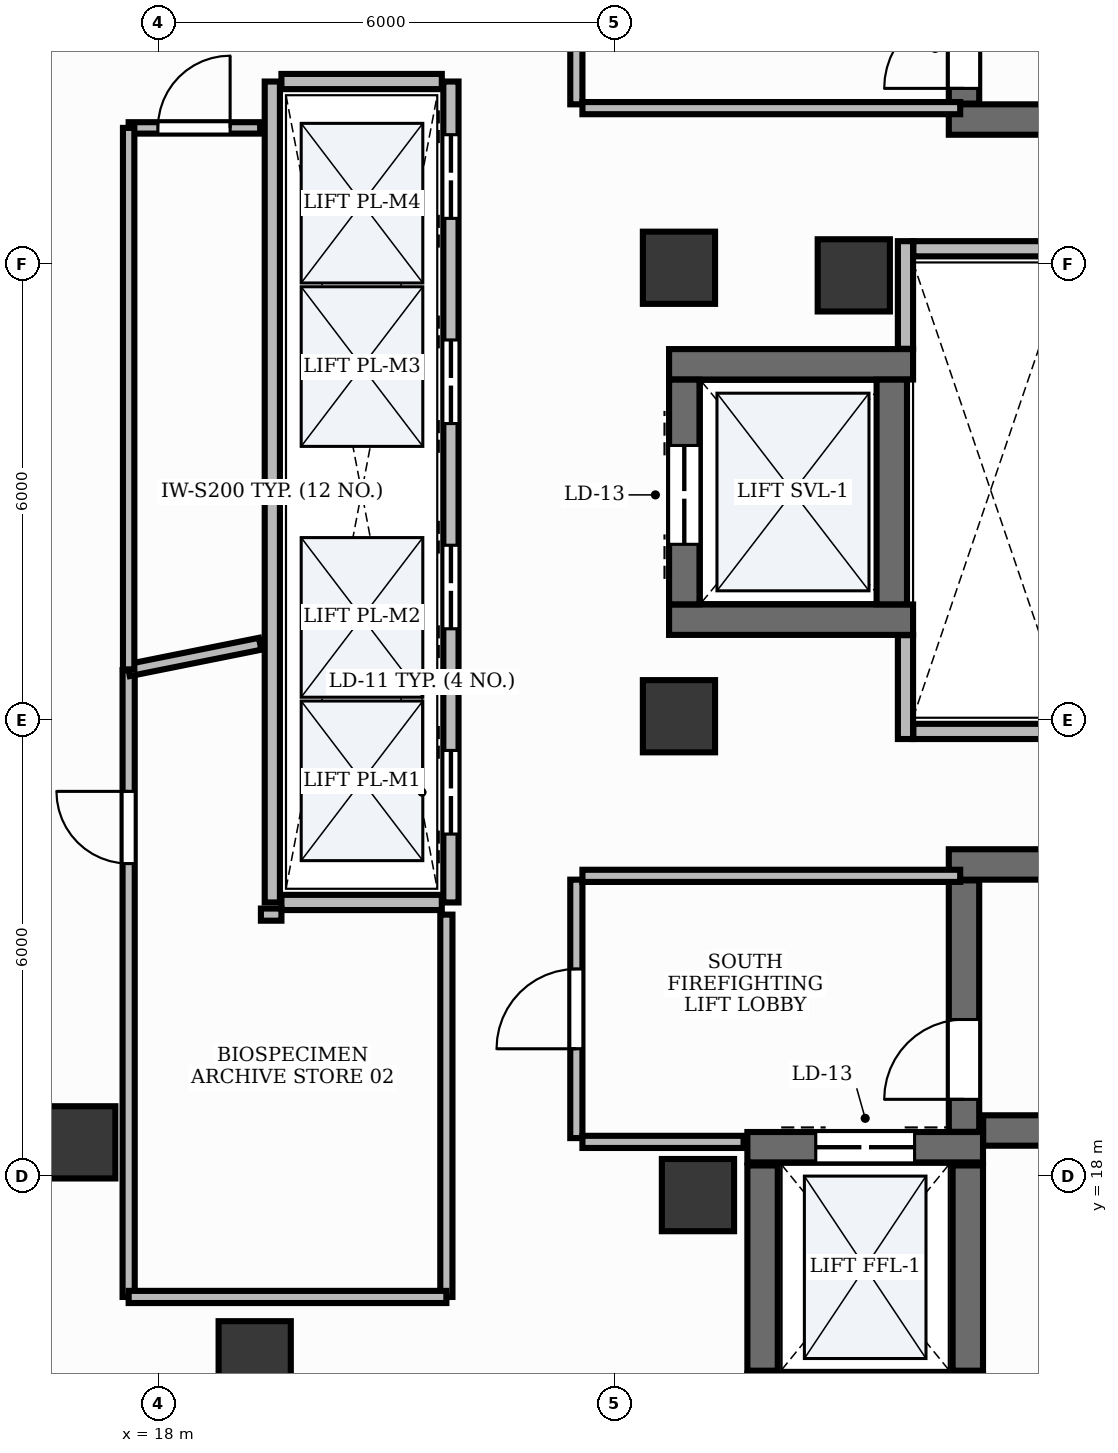
"""IFC4 building model, lengths in metres.
Left out: names, types, materials, properties, quantities, classifications, styles, units other than length and angle.
Written with IfcOpenShell. Run it as: python <this file> out.ifc"""

import sys

from ifc_helpers import new_model, si_unit, direction, frame, frame_2d, origin, origin_2d, place, context, subcontext, project, spatial, rectangle, extrude, element, fill, save


model = new_model("IFC4")
c1 = context("Model", 3, precision=1e-05, world=origin(), true_north=direction((0.0, 1.0)))
c2 = subcontext(c1, "Body", "Model", "MODEL_VIEW")
j1 = project(units=[si_unit("LENGTHUNIT", "METRE"), si_unit("PLANEANGLEUNIT", "RADIAN")], contexts=[c1])
p1 = place(None, origin())
s1 = spatial("IfcSite", under=j1, at=p1, CompositionType="ELEMENT")
p2 = place(p1, origin())
s2 = spatial("IfcBuilding", under=s1, at=p2, CompositionType="ELEMENT")
p3 = place(p2, frame((0.0, 0.0, 235.2)))
s3 = spatial("IfcBuildingStorey", under=s2, at=p3, CompositionType="ELEMENT", Elevation=235.2)
p4 = place(p3, frame((28.4, 31.9, 0.0), z_axis=(0.0, 0.0, 1.0), x_axis=(1.0, 0.0, 0.0)))
e1 = element("IfcWall", 1, at=p4, inside=s3, PredefinedType="SHEAR", context=c2, shape_type="SweptSolid", body=[
    extrude(rectangle(XDim=8.65, YDim=0.4, at=frame_2d((4.325, 0.0))), origin(), (0.0, 0.0, 1.0), 3.9),
])
p5 = place(p3, frame((28.6, 32.11, 0.0), z_axis=(0.0, 0.0, 1.0), x_axis=(0.0, 1.0, 0.0)))
e2 = element("IfcWall", 2, at=p5, inside=s3, PredefinedType="SHEAR", context=c2, shape_type="SweptSolid", body=[
    extrude(rectangle(XDim=3.308, YDim=0.4, at=frame_2d((1.654, 0.0))), origin(), (0.0, 0.0, 1.0), 3.9),
])
p6 = place(p5, frame((0.2, 0.0, 0.0)))
e3 = element("IfcOpeningElement", 3, at=p6, cuts=e2, PredefinedType="OPENING", context=c2, shape_type="SweptSolid", body=[
    extrude(rectangle(XDim=1.05, YDim=2.15, at=frame_2d((0.525, 1.075))), frame((0.0, 0.215, 0.0), z_axis=(0.0, -1.0, 0.0), x_axis=(1.0, 0.0, 0.0)), (0.0, 0.0, 1.0), 0.43),
])
p7 = place(p3, frame((28.852, 18.6, 0.0), z_axis=(0.0, 0.0, 1.0), x_axis=(1.0, 0.0, 0.0)))
e4 = element("IfcWall", 4, at=p7, inside=s3, PredefinedType="SHEAR", context=c2, shape_type="SweptSolid", body=[
    extrude(rectangle(XDim=8.198, YDim=0.4, at=frame_2d((4.099, 0.0))), origin(), (0.0, 0.0, 1.0), 3.9),
])
p8 = place(p3, frame((28.4, 22.1, 0.0), z_axis=(0.0, 0.0, 1.0), x_axis=(1.0, 0.0, 0.0)))
e5 = element("IfcWall", 5, at=p8, inside=s3, PredefinedType="SHEAR", context=c2, shape_type="SweptSolid", body=[
    extrude(rectangle(XDim=8.65, YDim=0.4, at=frame_2d((4.325, 0.0))), origin(), (0.0, 0.0, 1.0), 3.9),
])
p9 = place(p3, frame((28.6, 18.582, 0.0), z_axis=(0.0, 0.0, 1.0), x_axis=(0.0, 1.0, 0.0)))
e6 = element("IfcWall", 6, at=p9, inside=s3, PredefinedType="SHEAR", context=c2, shape_type="SweptSolid", body=[
    extrude(rectangle(XDim=3.308, YDim=0.4, at=frame_2d((1.654, 0.0))), origin(), (0.0, 0.0, 1.0), 3.9),
])
p10 = place(p9, frame((0.428, 0.0, 0.0)))
e7 = element("IfcOpeningElement", 7, at=p10, cuts=e6, PredefinedType="OPENING", context=c2, shape_type="SweptSolid", body=[
    extrude(rectangle(XDim=1.05, YDim=2.15, at=frame_2d((0.525, 1.075))), frame((0.0, 0.215, 0.0), z_axis=(0.0, -1.0, 0.0), x_axis=(1.0, 0.0, 0.0)), (0.0, 0.0, 1.0), 0.43),
])
p11 = place(p3, frame((25.75, 18.38, 0.0), z_axis=(0.0, 0.0, 1.0), x_axis=(1.0, 0.0, 0.0)))
e8 = element("IfcWall", 8, at=p11, inside=s3, PredefinedType="SHEAR", context=c2, shape_type="SweptSolid", body=[
    extrude(rectangle(XDim=3.1, YDim=0.4, at=frame_2d((1.55, 0.0))), origin(), (0.0, 0.0, 1.0), 3.9),
])
p12 = place(p11, frame((0.9, 0.0, 0.0)))
e9 = element("IfcOpeningElement", 9, at=p12, cuts=e8, PredefinedType="OPENING", context=c2, shape_type="SweptSolid", body=[
    extrude(rectangle(XDim=1.3, YDim=2.2, at=frame_2d((0.65, 1.1))), frame((0.0, 0.215, 0.0), z_axis=(0.0, -1.0, 0.0), x_axis=(1.0, 0.0, 0.0)), (0.0, 0.0, 1.0), 0.43),
])
for number, where, z_axis, x_axis in (
    (10, (25.95, 15.44, 0.0), (0.0, 0.0, 1.0), (0.0, 1.0, 0.0)),
    (11, (28.65, 15.44, 0.0), (0.0, 0.0, 1.0), (0.0, 1.0, 0.0)),
):
    element("IfcWall", number, at=place(p3, frame(where, z_axis=z_axis, x_axis=x_axis)), inside=s3, PredefinedType="SHEAR", context=c2, shape_type="SweptSolid", body=[
        extrude(rectangle(XDim=2.7, YDim=0.4, at=frame_2d((1.35, 0.0))), origin(), (0.0, 0.0, 1.0), 3.9),
    ])
for number, where, z_axis, x_axis in (
    (12, (24.72, 28.68, 0.0), (0.0, 0.0, 1.0), (1.0, 0.0, 0.0)),
    (13, (24.72, 25.32, 0.0), (0.0, 0.0, 1.0), (1.0, 0.0, 0.0)),
):
    element("IfcWall", number, at=place(p3, frame(where, z_axis=z_axis, x_axis=x_axis)), inside=s3, PredefinedType="SHEAR", context=c2, shape_type="SweptSolid", body=[
        extrude(rectangle(XDim=3.21, YDim=0.4, at=frame_2d((1.605, 0.0))), origin(), (0.0, 0.0, 1.0), 3.9),
    ])
p13 = place(p3, frame((24.92, 25.522, 0.0), z_axis=(0.0, 0.0, 1.0), x_axis=(0.0, 1.0, 0.0)))
e14 = element("IfcWall", 14, at=p13, inside=s3, PredefinedType="SHEAR", context=c2, shape_type="SweptSolid", body=[
    extrude(rectangle(XDim=2.956, YDim=0.4, at=frame_2d((1.478, 0.0))), origin(), (0.0, 0.0, 1.0), 3.9),
])
p14 = place(p13, frame((0.79, 0.0, 0.0)))
e15 = element("IfcOpeningElement", 15, at=p14, cuts=e14, PredefinedType="OPENING", context=c2, shape_type="SweptSolid", body=[
    extrude(rectangle(XDim=1.3, YDim=2.2, at=frame_2d((0.65, 1.1))), frame((0.0, 0.215, 0.0), z_axis=(0.0, -1.0, 0.0), x_axis=(1.0, 0.0, 0.0)), (0.0, 0.0, 1.0), 0.43),
])
p15 = place(p3, frame((27.65, 25.522, 0.0), z_axis=(0.0, 0.0, 1.0), x_axis=(0.0, 1.0, 0.0)))
e16 = element("IfcWall", 16, at=p15, inside=s3, PredefinedType="SHEAR", context=c2, shape_type="SweptSolid", body=[
    extrude(rectangle(XDim=2.956, YDim=0.4, at=frame_2d((1.478, 0.0))), origin(), (0.0, 0.0, 1.0), 3.9),
])
for number, where, z_axis, x_axis in (
    (17, (24.85, 29.95, -0.0), (0.0, 0.0, 1.0), (1.0, 0.0, 0.0)),
    (18, (27.15, 29.85, -0.0), (0.0, 0.0, 1.0), (1.0, 0.0, 0.0)),
    (19, (24.85, 24.05, -0.0), (0.0, 0.0, 1.0), (1.0, 0.0, 0.0)),
    (20, (25.1, 17.75, -0.0), (0.0, 0.0, 1.0), (1.0, 0.0, 0.0)),
):
    element("IfcColumn", number, at=place(p3, frame(where, z_axis=z_axis, x_axis=x_axis)), inside=s3, PredefinedType="PILASTER", context=c2, shape_type="SweptSolid", body=[
        extrude(rectangle(XDim=0.95, YDim=0.95, at=origin_2d()), origin(), (0.0, 0.0, 1.0), 3.901),
    ])
for number, where, z_axis, x_axis in (
    (21, (16.96, 18.444, -0.0), (0.0, 0.0, 1.0), (1.0, 0.0, 0.0)),
    (22, (19.268, 15.616, -0.0), (0.0, 0.0, 1.0), (1.0, 0.0, 0.0)),
):
    element("IfcColumn", number, at=place(p3, frame(where, z_axis=z_axis, x_axis=x_axis)), inside=s3, PredefinedType="COLUMN", context=c2, shape_type="SweptSolid", body=[
        extrude(rectangle(XDim=0.95, YDim=0.95, at=origin_2d()), origin(), (0.0, 0.0, 1.0), 3.901),
    ])
p16 = place(p3, frame((19.5, 21.6, 0.0), z_axis=(0.0, 0.0, 1.0), x_axis=(0.0, 1.0, 0.0)))
e23 = element("IfcWall", 23, at=p16, inside=s3, PredefinedType="PARTITIONING", context=c2, shape_type="SweptSolid", body=[
    extrude(rectangle(XDim=10.8, YDim=0.2, at=frame_2d((5.4, 0.0))), origin(), (0.0, 0.0, 1.0), 2.91),
])
p17 = place(p3, frame((21.85, 21.6, 0.0), z_axis=(0.0, 0.0, 1.0), x_axis=(0.0, 1.0, 0.0)))
e24 = element("IfcWall", 24, at=p17, inside=s3, PredefinedType="PARTITIONING", context=c2, shape_type="SweptSolid", body=[
    extrude(rectangle(XDim=10.8, YDim=0.2, at=frame_2d((5.4, 0.0))), origin(), (0.0, 0.0, 1.0), 2.91),
])
p18 = place(p17, frame((0.9, 0.0, 0.0)))
e25 = element("IfcOpeningElement", 25, at=p18, cuts=e24, PredefinedType="OPENING", context=c2, shape_type="SweptSolid", body=[
    extrude(rectangle(XDim=1.1, YDim=2.2, at=frame_2d((0.55, 1.1))), frame((0.0, 0.115, 0.0), z_axis=(0.0, -1.0, 0.0), x_axis=(1.0, 0.0, 0.0)), (0.0, 0.0, 1.0), 0.23),
])
p19 = place(p17, frame((3.6, 0.0, 0.0)))
e26 = element("IfcOpeningElement", 26, at=p19, cuts=e24, PredefinedType="OPENING", context=c2, shape_type="SweptSolid", body=[
    extrude(rectangle(XDim=1.1, YDim=2.2, at=frame_2d((0.55, 1.1))), frame((0.0, 0.115, 0.0), z_axis=(0.0, -1.0, 0.0), x_axis=(1.0, 0.0, 0.0)), (0.0, 0.0, 1.0), 0.23),
])
p20 = place(p17, frame((6.3, 0.0, 0.0)))
e27 = element("IfcOpeningElement", 27, at=p20, cuts=e24, PredefinedType="OPENING", context=c2, shape_type="SweptSolid", body=[
    extrude(rectangle(XDim=1.1, YDim=2.2, at=frame_2d((0.55, 1.1))), frame((0.0, 0.115, 0.0), z_axis=(0.0, -1.0, 0.0), x_axis=(1.0, 0.0, 0.0)), (0.0, 0.0, 1.0), 0.23),
])
p21 = place(p17, frame((9.0, 0.0, 0.0)))
e28 = element("IfcOpeningElement", 28, at=p21, cuts=e24, PredefinedType="OPENING", context=c2, shape_type="SweptSolid", body=[
    extrude(rectangle(XDim=1.1, YDim=2.2, at=frame_2d((0.55, 1.1))), frame((0.0, 0.115, 0.0), z_axis=(0.0, -1.0, 0.0), x_axis=(1.0, 0.0, 0.0)), (0.0, 0.0, 1.0), 0.23),
])
for number, where, z_axis, x_axis in (
    (29, (19.62, 21.6, 0.0), (0.0, 0.0, 1.0), (1.0, 0.0, 0.0)),
    (30, (19.62, 32.4, 0.0), (0.0, 0.0, 1.0), (1.0, 0.0, 0.0)),
):
    element("IfcWall", number, at=place(p3, frame(where, z_axis=z_axis, x_axis=x_axis)), inside=s3, PredefinedType="PARTITIONING", context=c2, shape_type="SweptSolid", body=[
        extrude(rectangle(XDim=2.11, YDim=0.2, at=frame_2d((1.055, 0.0))), origin(), (0.0, 0.0, 1.0), 2.91),
    ])
p22 = place(p3, frame((27.83, 23.75, 0.0), z_axis=(0.0, 0.0, 1.0), x_axis=(0.0, 1.0, 0.0)))
e31 = element("IfcWall", 31, at=p22, inside=s3, PredefinedType="PARTITIONING", context=c2, shape_type="SweptSolid", body=[
    extrude(rectangle(XDim=1.366, YDim=0.2, at=frame_2d((0.683, 0.0))), origin(), (0.0, 0.0, 1.0), 2.91),
])
p23 = place(p3, frame((27.83, 28.884, 0.0), z_axis=(0.0, 0.0, 1.0), x_axis=(0.0, 1.0, 0.0)))
e32 = element("IfcWall", 32, at=p23, inside=s3, PredefinedType="PARTITIONING", context=c2, shape_type="SweptSolid", body=[
    extrude(rectangle(XDim=1.416, YDim=0.2, at=frame_2d((0.708, 0.0))), origin(), (0.0, 0.0, 1.0), 2.91),
])
for number, where, z_axis, x_axis in (
    (33, (27.934, 23.85, 0.0), (0.0, 0.0, 1.0), (1.0, 0.0, 0.0)),
    (34, (27.934, 30.2, 0.0), (0.0, 0.0, 1.0), (1.0, 0.0, 0.0)),
):
    element("IfcWall", number, at=place(p3, frame(where, z_axis=z_axis, x_axis=x_axis)), inside=s3, PredefinedType="PARTITIONING", context=c2, shape_type="SweptSolid", body=[
        extrude(rectangle(XDim=2.096, YDim=0.2, at=frame_2d((1.048, 0.0))), origin(), (0.0, 0.0, 1.0), 2.91),
    ])
p24 = place(p3, frame((23.5, 32.1, 0.0), z_axis=(0.0, 0.0, 1.0), x_axis=(0.0, 1.0, 0.0)))
e35 = element("IfcWall", 35, at=p24, inside=s3, PredefinedType="PARTITIONING", context=c2, shape_type="SweptSolid", body=[
    extrude(rectangle(XDim=3.4, YDim=0.16, at=frame_2d((1.7, 0.0))), origin(), (0.0, 0.0, 1.0), 2.91),
])
p25 = place(p24, frame((1.175, 0.0, 0.0)))
e36 = element("IfcOpeningElement", 36, at=p25, cuts=e35, PredefinedType="OPENING", context=c2, shape_type="SweptSolid", body=[
    extrude(rectangle(XDim=1.05, YDim=2.15, at=frame_2d((0.525, 1.075))), frame((0.0, 0.095, 0.0), z_axis=(0.0, -1.0, 0.0), x_axis=(1.0, 0.0, 0.0)), (0.0, 0.0, 1.0), 0.19),
])
p26 = place(p3, frame((23.5, 18.5, 0.0), z_axis=(0.0, 0.0, 1.0), x_axis=(0.0, 1.0, 0.0)))
e37 = element("IfcWall", 37, at=p26, inside=s3, PredefinedType="PARTITIONING", context=c2, shape_type="SweptSolid", body=[
    extrude(rectangle(XDim=3.4, YDim=0.16, at=frame_2d((1.7, 0.0))), origin(), (0.0, 0.0, 1.0), 2.91),
])
p27 = place(p26, frame((1.175, 0.0, 0.0)))
e38 = element("IfcOpeningElement", 38, at=p27, cuts=e37, PredefinedType="OPENING", context=c2, shape_type="SweptSolid", body=[
    extrude(rectangle(XDim=1.05, YDim=2.15, at=frame_2d((0.525, 1.075))), frame((0.0, 0.095, 0.0), z_axis=(0.0, -1.0, 0.0), x_axis=(1.0, 0.0, 0.0)), (0.0, 0.0, 1.0), 0.19),
])
for number, where, z_axis, x_axis in (
    (39, (23.58, 32.05, 0.0), (0.0, 0.0, 1.0), (1.0, 0.0, 0.0)),
    (40, (23.58, 21.95, 0.0), (0.0, 0.0, 1.0), (1.0, 0.0, 0.0)),
):
    element("IfcWall", number, at=place(p3, frame(where, z_axis=z_axis, x_axis=x_axis)), inside=s3, PredefinedType="PARTITIONING", context=c2, shape_type="SweptSolid", body=[
        extrude(rectangle(XDim=4.97, YDim=0.16, at=frame_2d((2.485, 0.0))), origin(), (0.0, 0.0, 1.0), 2.91),
    ])
p28 = place(p3, frame((23.58, 18.45, 0.0), z_axis=(0.0, 0.0, 1.0), x_axis=(1.0, 0.0, 0.0)))
e41 = element("IfcWall", 41, at=p28, inside=s3, PredefinedType="PARTITIONING", context=c2, shape_type="SweptSolid", body=[
    extrude(rectangle(XDim=2.12, YDim=0.16, at=frame_2d((1.06, 0.0))), origin(), (0.0, 0.0, 1.0), 2.91),
])
p29 = place(p3, frame((17.61, 16.41, 0.0), z_axis=(0.0, 0.0, 1.0), x_axis=(0.0, 1.0, 0.0)))
e42 = element("IfcWall", 42, at=p29, inside=s3, PredefinedType="PARTITIONING", context=c2, shape_type="SweptSolid", body=[
    extrude(rectangle(XDim=8.246, YDim=0.16, at=frame_2d((4.123, 0.0))), origin(), (0.0, 0.0, 1.0), 2.91),
])
p30 = place(p29, frame((5.701, 0.0, 0.0)))
e43 = element("IfcOpeningElement", 43, at=p30, cuts=e42, PredefinedType="OPENING", context=c2, shape_type="SweptSolid", body=[
    extrude(rectangle(XDim=0.95, YDim=2.15, at=frame_2d((0.475, 1.075))), frame((0.0, 0.095, 0.0), z_axis=(0.0, -1.0, 0.0), x_axis=(1.0, 0.0, 0.0)), (0.0, 0.0, 1.0), 0.19),
])
p31 = place(p3, frame((17.61, 31.79, 0.0), z_axis=(0.0, 0.0, 1.0), x_axis=(1.0, 0.0, 0.0)))
e44 = element("IfcWall", 44, at=p31, inside=s3, PredefinedType="PARTITIONING", context=c2, shape_type="SweptSolid", body=[
    extrude(rectangle(XDim=1.73, YDim=0.15, at=frame_2d((0.865, 0.0))), origin(), (0.0, 0.0, 1.0), 2.91),
])
p32 = place(p31, frame((0.385, 0.0, 0.0)))
e45 = element("IfcOpeningElement", 45, at=p32, cuts=e44, PredefinedType="OPENING", context=c2, shape_type="SweptSolid", body=[
    extrude(rectangle(XDim=0.95, YDim=2.15, at=frame_2d((0.475, 1.075))), frame((0.0, 0.09, 0.0), z_axis=(0.0, -1.0, 0.0), x_axis=(1.0, 0.0, 0.0)), (0.0, 0.0, 1.0), 0.18),
])
p33 = place(p3, frame((19.35, 21.44, 0.0), z_axis=(0.0, 0.0, 1.0), x_axis=(1.0, 0.0, 0.0)))
e46 = element("IfcWall", 46, at=p33, inside=s3, PredefinedType="PARTITIONING", context=c2, shape_type="SweptSolid", body=[
    extrude(rectangle(XDim=0.27, YDim=0.16, at=frame_2d((0.135, 0.0))), origin(), (0.0, 0.0, 1.0), 2.91),
])
p34 = place(p3, frame((21.79, 21.44, 0.0), z_axis=(0.0, 0.0, 1.0), x_axis=(0.0, -1.0, 0.0)))
e47 = element("IfcWall", 47, at=p34, inside=s3, PredefinedType="PARTITIONING", context=c2, shape_type="SweptSolid", body=[
    extrude(rectangle(XDim=5.03, YDim=0.16, at=frame_2d((2.515, 0.0))), origin(), (0.0, 0.0, 1.0), 2.91),
])
p35 = place(p3, frame((21.79, 16.41, 0.0), z_axis=(0.0, 0.0, 1.0), x_axis=(-1.0, 0.0, 0.0)))
e48 = element("IfcWall", 48, at=p35, inside=s3, PredefinedType="PARTITIONING", context=c2, shape_type="SweptSolid", body=[
    extrude(rectangle(XDim=4.18, YDim=0.16, at=frame_2d((2.09, 0.0))), origin(), (0.0, 0.0, 1.0), 2.91),
])
p36 = place(p3, frame((17.61, 24.656, 0.0), z_axis=(0.0, 0.0, 1.0), x_axis=(0.980447388895, 0.196781395485, 0.0)))
e49 = element("IfcWall", 49, at=p36, inside=s3, PredefinedType="PARTITIONING", context=c2, shape_type="SweptSolid", body=[
    extrude(rectangle(XDim=1.764, YDim=0.16, at=frame_2d((0.882, 0.0))), origin(), (0.0, 0.0, 1.0), 2.91),
])
p37 = place(p3, frame((17.61, 24.667, 0.0), z_axis=(0.0, 0.0, 1.0), x_axis=(0.0, 1.0, 0.0)))
e50 = element("IfcWall", 50, at=p37, inside=s3, PredefinedType="PARTITIONING", context=c2, shape_type="SweptSolid", body=[
    extrude(rectangle(XDim=7.124, YDim=0.15, at=frame_2d((3.562, 0.0))), origin(), (0.0, 0.0, 1.0), 2.91),
])
p38 = place(p6, origin())
e51 = element("IfcDoor", 51, at=p38, inside=s3, OperationType="SINGLE_SWING_LEFT", PredefinedType="DOOR", context=c2, shape_type="SweptSolid", body=[
    extrude(rectangle(XDim=1.05, YDim=2.15, at=frame_2d((0.525, 1.075))), frame((0.0, 0.025, 0.0), z_axis=(0.0, -1.0, 0.0), x_axis=(1.0, 0.0, 0.0)), (0.0, 0.0, 1.0), 0.05),
])
fill(e3, e51)
p39 = place(p10, origin())
e52 = element("IfcDoor", 52, at=p39, inside=s3, OperationType="SINGLE_SWING_LEFT", PredefinedType="DOOR", context=c2, shape_type="SweptSolid", body=[
    extrude(rectangle(XDim=1.05, YDim=2.15, at=frame_2d((0.525, 1.075))), frame((0.0, 0.025, 0.0), z_axis=(0.0, -1.0, 0.0), x_axis=(1.0, 0.0, 0.0)), (0.0, 0.0, 1.0), 0.05),
])
fill(e7, e52)
p40 = place(p18, origin())
e53 = element("IfcDoor", 53, at=p40, inside=s3, OperationType="DOUBLE_DOOR_SLIDING", PredefinedType="DOOR", context=c2, shape_type="SweptSolid", body=[
    extrude(rectangle(XDim=1.1, YDim=2.2, at=frame_2d((0.55, 1.1))), frame((0.0, 0.025, 0.0), z_axis=(0.0, -1.0, 0.0), x_axis=(1.0, 0.0, 0.0)), (0.0, 0.0, 1.0), 0.05),
])
fill(e25, e53)
p41 = place(p19, origin())
e54 = element("IfcDoor", 54, at=p41, inside=s3, OperationType="DOUBLE_DOOR_SLIDING", PredefinedType="DOOR", context=c2, shape_type="SweptSolid", body=[
    extrude(rectangle(XDim=1.1, YDim=2.2, at=frame_2d((0.55, 1.1))), frame((0.0, 0.025, 0.0), z_axis=(0.0, -1.0, 0.0), x_axis=(1.0, 0.0, 0.0)), (0.0, 0.0, 1.0), 0.05),
])
fill(e26, e54)
p42 = place(p20, origin())
e55 = element("IfcDoor", 55, at=p42, inside=s3, OperationType="DOUBLE_DOOR_SLIDING", PredefinedType="DOOR", context=c2, shape_type="SweptSolid", body=[
    extrude(rectangle(XDim=1.1, YDim=2.2, at=frame_2d((0.55, 1.1))), frame((0.0, 0.025, 0.0), z_axis=(0.0, -1.0, 0.0), x_axis=(1.0, 0.0, 0.0)), (0.0, 0.0, 1.0), 0.05),
])
fill(e27, e55)
p43 = place(p21, origin())
e56 = element("IfcDoor", 56, at=p43, inside=s3, OperationType="DOUBLE_DOOR_SLIDING", PredefinedType="DOOR", context=c2, shape_type="SweptSolid", body=[
    extrude(rectangle(XDim=1.1, YDim=2.2, at=frame_2d((0.55, 1.1))), frame((0.0, 0.025, 0.0), z_axis=(0.0, -1.0, 0.0), x_axis=(1.0, 0.0, 0.0)), (0.0, 0.0, 1.0), 0.05),
])
fill(e28, e56)
p44 = place(p12, origin())
e57 = element("IfcDoor", 57, at=p44, inside=s3, OperationType="DOUBLE_DOOR_SLIDING", PredefinedType="DOOR", context=c2, shape_type="SweptSolid", body=[
    extrude(rectangle(XDim=1.3, YDim=2.2, at=frame_2d((0.65, 1.1))), frame((0.0, 0.025, 0.0), z_axis=(0.0, -1.0, 0.0), x_axis=(1.0, 0.0, 0.0)), (0.0, 0.0, 1.0), 0.05),
])
fill(e9, e57)
p45 = place(p14, origin())
e58 = element("IfcDoor", 58, at=p45, inside=s3, OperationType="DOUBLE_DOOR_SLIDING", PredefinedType="DOOR", context=c2, shape_type="SweptSolid", body=[
    extrude(rectangle(XDim=1.3, YDim=2.2, at=frame_2d((0.65, 1.1))), frame((0.0, 0.025, 0.0), z_axis=(0.0, -1.0, 0.0), x_axis=(1.0, 0.0, 0.0)), (0.0, 0.0, 1.0), 0.05),
])
fill(e15, e58)
p46 = place(p27, origin())
e59 = element("IfcDoor", 59, at=p46, inside=s3, OperationType="SINGLE_SWING_LEFT", PredefinedType="DOOR", context=c2, shape_type="SweptSolid", body=[
    extrude(rectangle(XDim=1.05, YDim=2.15, at=frame_2d((0.525, 1.075))), frame((0.0, 0.025, 0.0), z_axis=(0.0, -1.0, 0.0), x_axis=(1.0, 0.0, 0.0)), (0.0, 0.0, 1.0), 0.05),
])
fill(e38, e59)
p47 = place(p30, origin())
e60 = element("IfcDoor", 60, at=p47, inside=s3, OperationType="SINGLE_SWING_RIGHT", PredefinedType="DOOR", context=c2, shape_type="SweptSolid", body=[
    extrude(rectangle(XDim=0.95, YDim=2.15, at=frame_2d((0.475, 1.075))), frame((0.0, 0.025, 0.0), z_axis=(0.0, -1.0, 0.0), x_axis=(1.0, 0.0, 0.0)), (0.0, 0.0, 1.0), 0.05),
])
fill(e43, e60)
p48 = place(p32, origin())
e61 = element("IfcDoor", 61, at=p48, inside=s3, OperationType="SINGLE_SWING_RIGHT", PredefinedType="DOOR", context=c2, shape_type="SweptSolid", body=[
    extrude(rectangle(XDim=0.95, YDim=2.15, at=frame_2d((0.475, 1.075))), frame((0.0, 0.025, 0.0), z_axis=(0.0, -1.0, 0.0), x_axis=(1.0, 0.0, 0.0)), (0.0, 0.0, 1.0), 0.05),
])
fill(e45, e61)
save(model, sys.argv[1])
